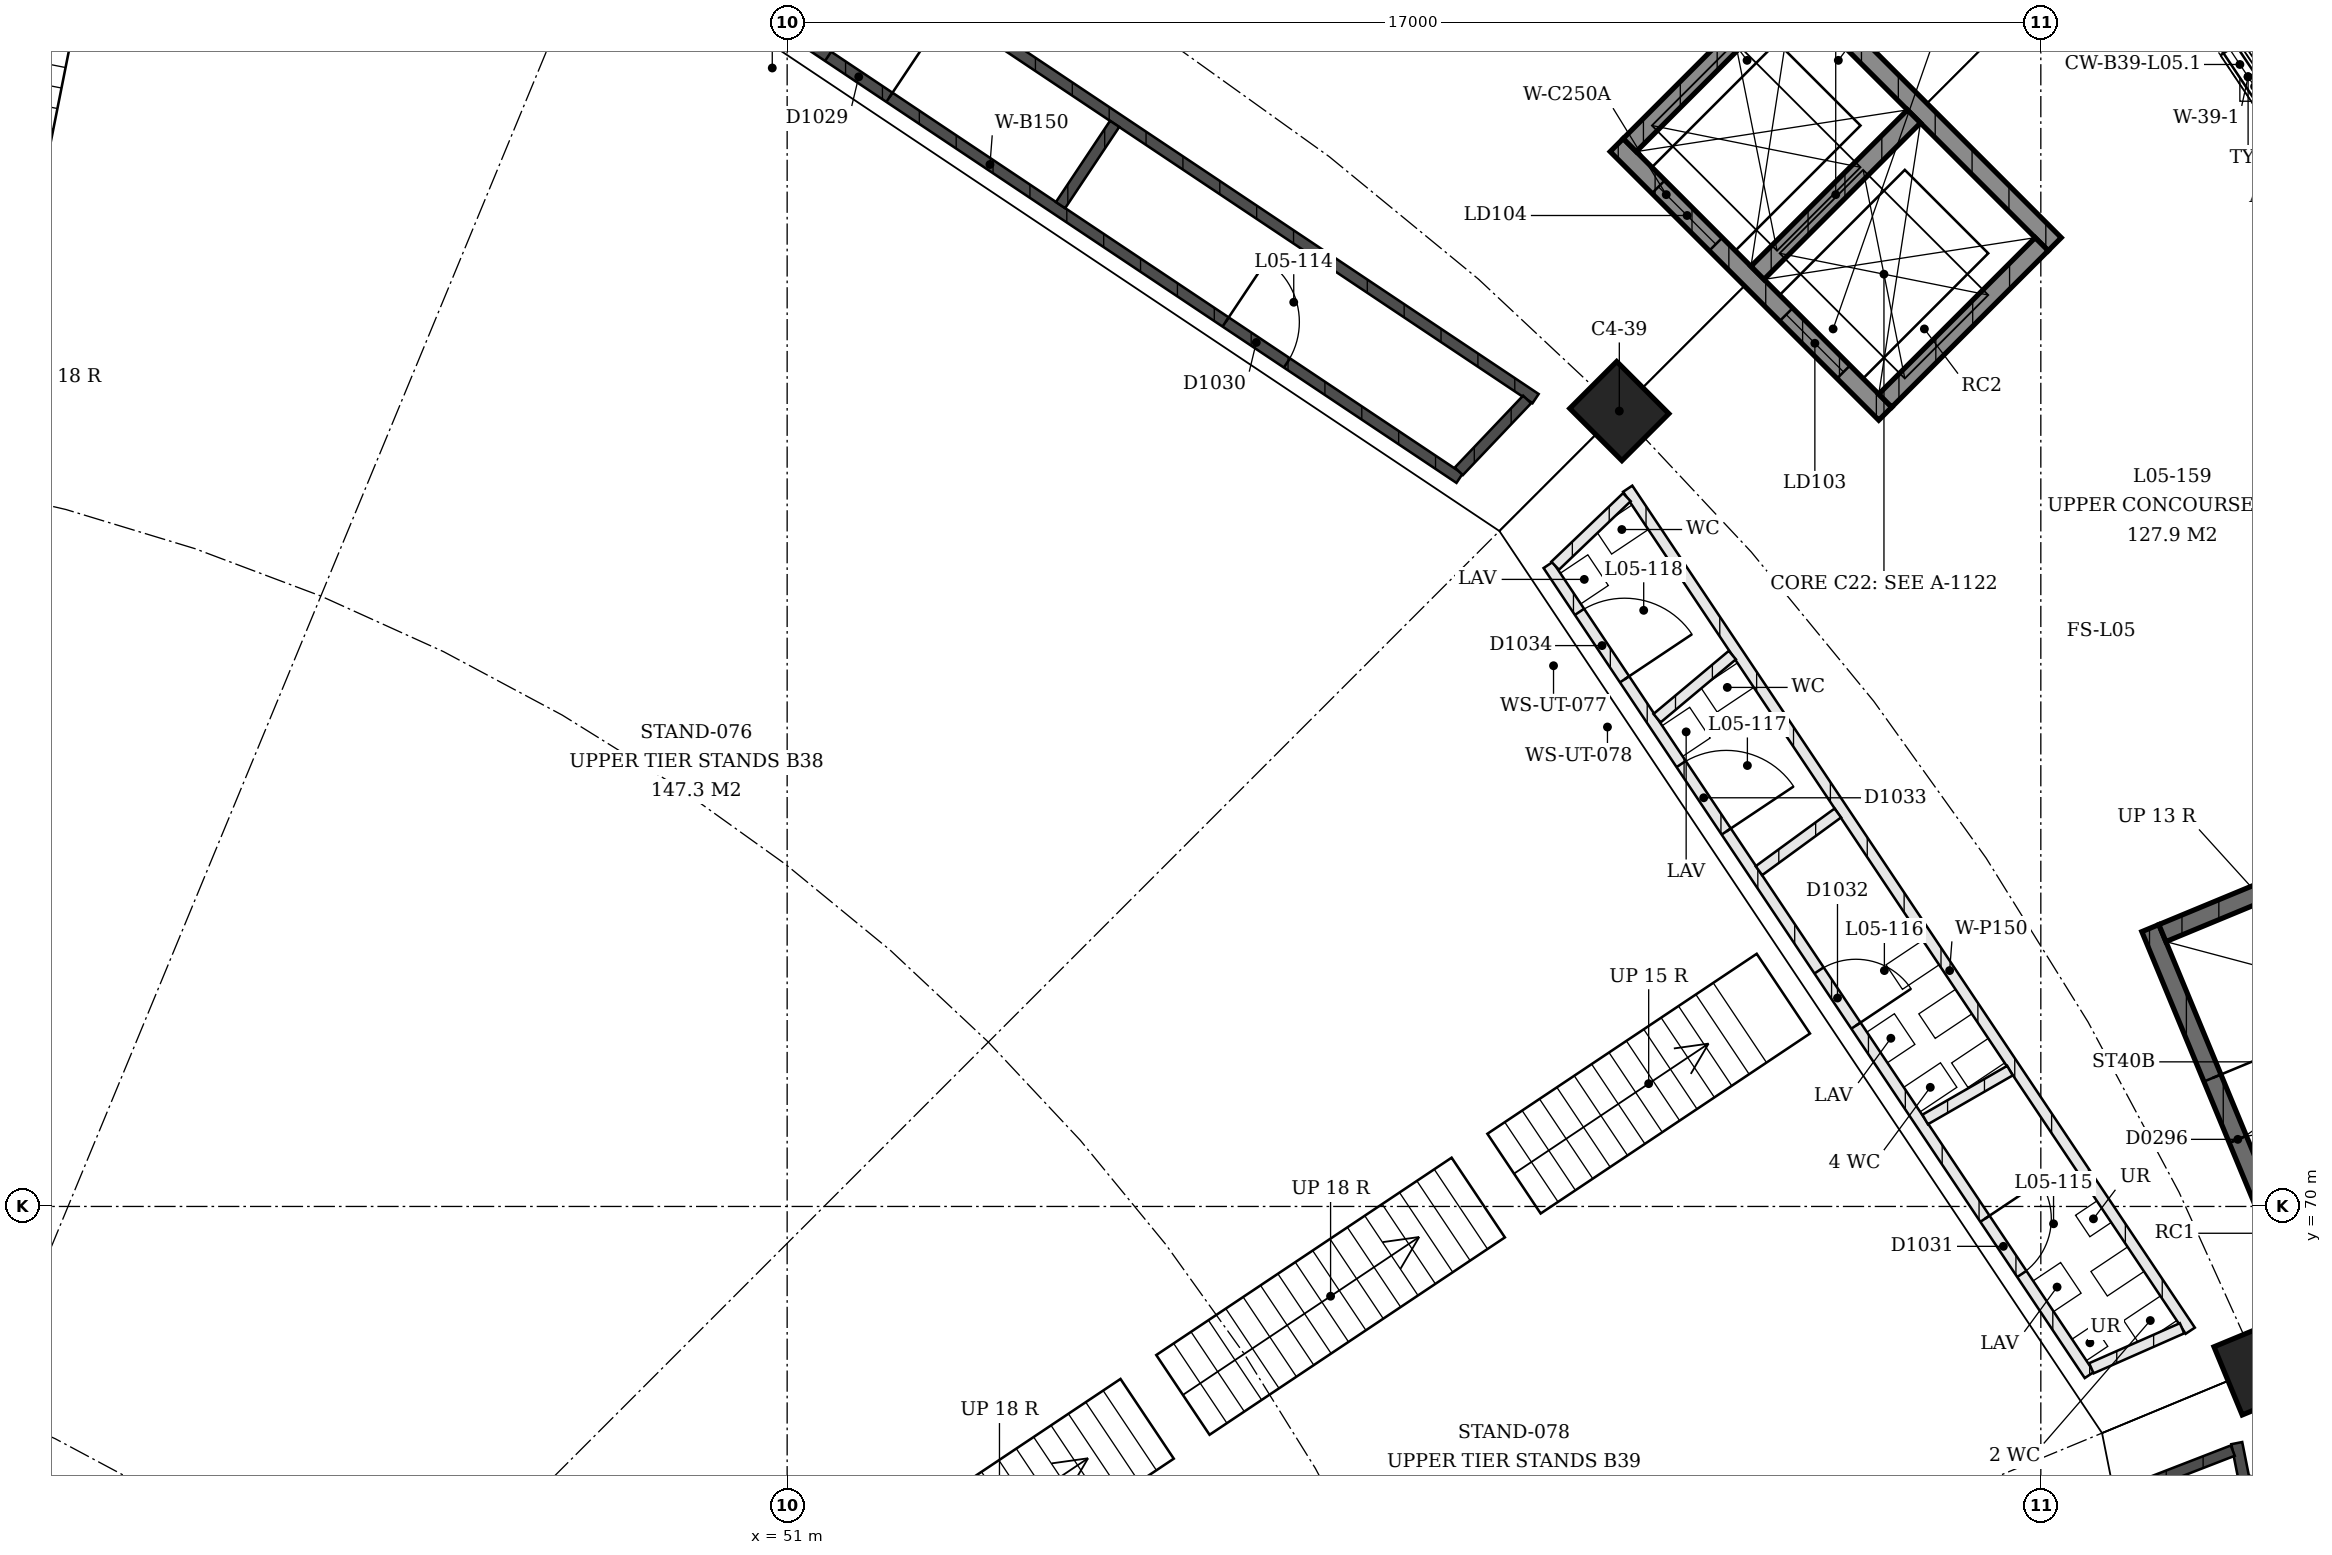
"""IFC4 building model, lengths in metres.
Left out: names, types, materials, properties, quantities, classifications, styles, units other than length and angle.
Written with IfcOpenShell. Run it as: python <this file> out.ifc"""

import sys

from ifc_helpers import new_model, si_unit, direction, frame, frame_2d, origin, origin_2d, place, context, subcontext, project, spatial, polyline, rectangle, outline, extrude, element, fill, save


model = new_model("IFC4")
c1 = context("Model", 3, precision=1e-05, world=origin(), true_north=direction((0.0, 1.0)))
c2 = subcontext(c1, "Body", "Model", "MODEL_VIEW")
j1 = project(units=[si_unit("LENGTHUNIT", "METRE"), si_unit("PLANEANGLEUNIT", "RADIAN")], contexts=[c1])
p1 = place(None, origin())
s1 = spatial("IfcSite", under=j1, at=p1, CompositionType="ELEMENT")
p2 = place(p1, origin())
s2 = spatial("IfcBuilding", under=s1, at=p2, CompositionType="ELEMENT")
p3 = place(p2, frame((0.0, 0.0, 22.5)))
s3 = spatial("IfcBuildingStorey", under=s2, at=p3, CompositionType="ELEMENT", Elevation=22.5)
for number, where, z_axis, x_axis in (
    (1, (62.284, 80.784, 0.0), (0.0, 0.0, 1.0), (-0.707, 0.707, 0.0)),
    (2, (70.955, 67.807, 0.0), (0.0, 0.0, 1.0), (-0.383, 0.924, 0.0)),
):
    element("IfcColumn", number, at=place(p3, frame(where, z_axis=z_axis, x_axis=x_axis)), inside=s3, PredefinedType="COLUMN", context=c2, shape_type="SweptSolid", body=[
        extrude(rectangle(XDim=1.0, YDim=0.9, at=origin_2d()), origin(), (0.0, 0.0, 1.0), 6.5),
    ])
p4 = place(p3, frame((69.767, 86.879, 4.1), z_axis=(0.0, 0.0, 1.0), x_axis=(0.555554703021, -0.831479988906, 0.0)))
e3 = element("IfcWall", 3, at=p4, inside=s3, PredefinedType="SOLIDWALL", context=c2, shape_type="SweptSolid", body=[
    extrude(outline(polyline([(0.0, 0.0), (3.757, 0.0), (3.757, 0.05), (3.635, 1.311), (3.271, 2.577), (2.678, 3.754), (1.879, 4.8), (1.079, 3.754), (0.486, 2.577), (0.123, 1.311), (0.0, 0.05), (0.0, 0.0)])), frame((0.0, 0.15, 0.0), z_axis=(0.0, -1.0, 0.0), x_axis=(1.0, 0.0, 0.0)), (0.0, 0.0, 1.0), 0.3),
])
p5 = place(p4, frame((1.428, 0.0, 0.4)))
e4 = element("IfcOpeningElement", 4, at=p5, cuts=e3, PredefinedType="OPENING", context=c2, shape_type="SweptSolid", body=[
    extrude(rectangle(XDim=0.9, YDim=3.6, at=frame_2d((0.45, 1.8))), frame((0.0, 0.16, 0.0), z_axis=(0.0, -1.0, 0.0), x_axis=(1.0, 0.0, 0.0)), (0.0, 0.0, 1.0), 0.32),
])
p6 = place(p3, frame((74.135, 62.549, 0.0), z_axis=(0.0, 0.0, 1.0), x_axis=(-0.382688386133, 0.923877480578, 0.0)))
e5 = element("IfcWall", 5, at=p6, inside=s3, PredefinedType="SHEAR", context=c2, shape_type="SweptSolid", body=[
    extrude(rectangle(XDim=12.15, YDim=0.25, at=frame_2d((6.075, 0.0))), origin(), (0.0, 0.0, 1.0), 2.1),
])
p7 = place(p6, frame((2.2, 0.0, 0.0)))
e6 = element("IfcOpeningElement", 6, at=p7, cuts=e5, PredefinedType="OPENING", context=c2, shape_type="SweptSolid", body=[
    extrude(rectangle(XDim=1.8, YDim=2.1, at=frame_2d((0.9, 1.05))), frame((0.0, 0.125, 0.0), z_axis=(0.0, -1.0, 0.0), x_axis=(1.0, 0.0, 0.0)), (0.0, 0.0, 1.0), 0.25),
])
p8 = place(p6, frame((8.15, 0.0, 0.0)))
e7 = element("IfcOpeningElement", 7, at=p8, cuts=e5, PredefinedType="OPENING", context=c2, shape_type="SweptSolid", body=[
    extrude(rectangle(XDim=1.8, YDim=2.1, at=frame_2d((0.9, 1.05))), frame((0.0, 0.125, 0.0), z_axis=(0.0, -1.0, 0.0), x_axis=(1.0, 0.0, 0.0)), (0.0, 0.0, 1.0), 0.25),
])
p9 = place(p3, frame((69.648, 73.706, 0.0), z_axis=(0.0, 0.0, 1.0), x_axis=(0.923887204407, 0.382664910245, 0.0)))
e8 = element("IfcWall", 8, at=p9, inside=s3, PredefinedType="SHEAR", context=c2, shape_type="SweptSolid", body=[
    extrude(rectangle(XDim=7.46, YDim=0.25, at=frame_2d((3.73, 0.0))), origin(), (0.0, 0.0, 1.0), 2.1),
])
p10 = place(p3, frame((65.891, 80.749, 0.0), z_axis=(0.0, 0.0, 1.0), x_axis=(-0.707106781187, 0.707106781187, 0.0)))
e9 = element("IfcWall", 9, at=p10, inside=s3, PredefinedType="SHEAR", context=c2, shape_type="SweptSolid", body=[
    extrude(rectangle(XDim=5.15, YDim=0.25, at=frame_2d((2.575, 0.0))), origin(), (0.0, 0.0, 1.0), 3.4),
])
p11 = place(p10, frame((0.8, 0.0, 0.0)))
e10 = element("IfcOpeningElement", 10, at=p11, cuts=e9, PredefinedType="OPENING", context=c2, shape_type="SweptSolid", body=[
    extrude(rectangle(XDim=1.1, YDim=2.1, at=frame_2d((0.55, 1.05))), frame((0.0, 0.125, 0.0), z_axis=(0.0, -1.0, 0.0), x_axis=(1.0, 0.0, 0.0)), (0.0, 0.0, 1.0), 0.25),
])
p12 = place(p10, frame((3.25, 0.0, 0.0)))
e11 = element("IfcOpeningElement", 11, at=p12, cuts=e9, PredefinedType="OPENING", context=c2, shape_type="SweptSolid", body=[
    extrude(rectangle(XDim=1.1, YDim=2.1, at=frame_2d((0.55, 1.05))), frame((0.0, 0.125, 0.0), z_axis=(0.0, -1.0, 0.0), x_axis=(1.0, 0.0, 0.0)), (0.0, 0.0, 1.0), 0.25),
])
p13 = place(p3, frame((68.189, 83.047, 0.0), z_axis=(0.0, 0.0, 1.0), x_axis=(-0.707106781187, 0.707106781187, 0.0)))
e12 = element("IfcWall", 12, at=p13, inside=s3, PredefinedType="SHEAR", context=c2, shape_type="SweptSolid", body=[
    extrude(rectangle(XDim=5.15, YDim=0.25, at=frame_2d((2.575, 0.0))), origin(), (0.0, 0.0, 1.0), 3.4),
])
for number, where, z_axis, x_axis in (
    (13, (65.891, 80.926, 0.0), (0.0, 0.0, 1.0), (0.707, 0.707, 0.0)),
    (14, (62.426, 84.391, 0.0), (0.0, 0.0, 1.0), (0.707, 0.707, 0.0)),
):
    element("IfcWall", number, at=place(p3, frame(where, z_axis=z_axis, x_axis=x_axis)), inside=s3, PredefinedType="SHEAR", context=c2, shape_type="SweptSolid", body=[
        extrude(rectangle(XDim=3.0, YDim=0.25, at=frame_2d((1.5, 0.0))), origin(), (0.0, 0.0, 1.0), 3.4),
    ])
p14 = place(p3, frame((64.158, 82.658, 0.0), z_axis=(0.0, 0.0, 1.0), x_axis=(0.707106781187, 0.707106781187, 0.0)))
e15 = element("IfcWall", 15, at=p14, inside=s3, PredefinedType="SHEAR", context=c2, shape_type="SweptSolid", body=[
    extrude(rectangle(XDim=3.0, YDim=0.25, at=frame_2d((1.5, 0.0))), origin(), (0.0, 0.0, 1.0), 3.4),
])
p15 = place(p3, frame((49.215, 87.158, 0.0), z_axis=(0.0, 0.0, 1.0), x_axis=(0.831468390799, -0.555572061125, 0.0)))
e16 = element("IfcWall", 16, at=p15, inside=s3, PredefinedType="SOLIDWALL", context=c2, shape_type="SweptSolid", body=[
    extrude(rectangle(XDim=13.113, YDim=0.15, at=frame_2d((6.557, 0.0))), origin(), (0.0, 0.0, 1.0), 3.0),
])
p16 = place(p15, frame((2.815, 0.0, 0.0)))
e17 = element("IfcOpeningElement", 17, at=p16, cuts=e16, PredefinedType="OPENING", context=c2, shape_type="SweptSolid", body=[
    extrude(rectangle(XDim=1.0, YDim=2.1, at=frame_2d((0.5, 1.05))), frame((0.0, 0.075, 0.0), z_axis=(0.0, -1.0, 0.0), x_axis=(1.0, 0.0, 0.0)), (0.0, 0.0, 1.0), 0.15),
])
p17 = place(p15, frame((9.298, 0.0, 0.0)))
e18 = element("IfcOpeningElement", 18, at=p17, cuts=e16, PredefinedType="OPENING", context=c2, shape_type="SweptSolid", body=[
    extrude(rectangle(XDim=1.0, YDim=2.1, at=frame_2d((0.5, 1.05))), frame((0.0, 0.075, 0.0), z_axis=(0.0, -1.0, 0.0), x_axis=(1.0, 0.0, 0.0)), (0.0, 0.0, 1.0), 0.15),
])
p18 = place(p3, frame((49.815, 88.526, 0.0), z_axis=(0.0, 0.0, 1.0), x_axis=(0.831462899962, -0.555580278616, 0.0)))
e19 = element("IfcWall", 19, at=p18, inside=s3, PredefinedType="SOLIDWALL", context=c2, shape_type="SweptSolid", body=[
    extrude(rectangle(XDim=13.631, YDim=0.15, at=frame_2d((6.815, 0.0))), origin(), (0.0, 0.0, 1.0), 3.0),
])
p19 = place(p3, frame((54.707, 83.576, 0.0), z_axis=(0.0, 0.0, 1.0), x_axis=(0.554402331293, 0.832248793966, 0.0)))
e20 = element("IfcWall", 20, at=p19, inside=s3, PredefinedType="SOLIDWALL", context=c2, shape_type="SweptSolid", body=[
    extrude(rectangle(XDim=1.324, YDim=0.15, at=frame_2d((0.662, 0.0))), origin(), (0.0, 0.0, 1.0), 3.0),
])
p20 = place(p3, frame((60.108, 79.968, 0.0), z_axis=(0.0, 0.0, 1.0), x_axis=(0.688797211472, 0.724954068523, 0.0)))
e21 = element("IfcWall", 21, at=p20, inside=s3, PredefinedType="SOLIDWALL", context=c2, shape_type="SweptSolid", body=[
    extrude(rectangle(XDim=1.344, YDim=0.15, at=frame_2d((0.672, 0.0))), origin(), (0.0, 0.0, 1.0), 3.0),
])
p21 = place(p3, frame((68.658, 67.715, 0.0), z_axis=(0.0, 0.0, 1.0), x_axis=(-0.555570028225, 0.831469749142, 0.0)))
e22 = element("IfcWall", 22, at=p21, inside=s3, PredefinedType="PARTITIONING", context=c2, shape_type="SweptSolid", body=[
    extrude(rectangle(XDim=13.209, YDim=0.15, at=frame_2d((6.604, 0.0))), origin(), (0.0, 0.0, 1.0), 3.0),
])
p22 = place(p21, frame((1.648, 0.0, 0.0)))
e23 = element("IfcOpeningElement", 23, at=p22, cuts=e22, PredefinedType="OPENING", context=c2, shape_type="SweptSolid", body=[
    extrude(rectangle(XDim=0.9, YDim=2.1, at=frame_2d((0.45, 1.05))), frame((0.0, 0.075, 0.0), z_axis=(0.0, -1.0, 0.0), x_axis=(1.0, 0.0, 0.0)), (0.0, 0.0, 1.0), 0.15),
])
p23 = place(p21, frame((5.697, 0.0, 0.0)))
e24 = element("IfcOpeningElement", 24, at=p23, cuts=e22, PredefinedType="OPENING", context=c2, shape_type="SweptSolid", body=[
    extrude(rectangle(XDim=0.9, YDim=2.1, at=frame_2d((0.45, 1.05))), frame((0.0, 0.075, 0.0), z_axis=(0.0, -1.0, 0.0), x_axis=(1.0, 0.0, 0.0)), (0.0, 0.0, 1.0), 0.15),
])
p24 = place(p21, frame((8.863, 0.0, 0.0)))
e25 = element("IfcOpeningElement", 25, at=p24, cuts=e22, PredefinedType="OPENING", context=c2, shape_type="SweptSolid", body=[
    extrude(rectangle(XDim=1.1, YDim=2.1, at=frame_2d((0.55, 1.05))), frame((0.0, 0.075, 0.0), z_axis=(0.0, -1.0, 0.0), x_axis=(1.0, 0.0, 0.0)), (0.0, 0.0, 1.0), 0.15),
])
p25 = place(p21, frame((11.344, 0.0, 0.0)))
e26 = element("IfcOpeningElement", 26, at=p25, cuts=e22, PredefinedType="OPENING", context=c2, shape_type="SweptSolid", body=[
    extrude(rectangle(XDim=1.1, YDim=2.1, at=frame_2d((0.55, 1.05))), frame((0.0, 0.075, 0.0), z_axis=(0.0, -1.0, 0.0), x_axis=(1.0, 0.0, 0.0)), (0.0, 0.0, 1.0), 0.15),
])
p26 = place(p3, frame((70.026, 68.315, 0.0), z_axis=(0.0, 0.0, 1.0), x_axis=(-0.555573905052, 0.831467158717, 0.0)))
e27 = element("IfcWall", 27, at=p26, inside=s3, PredefinedType="PARTITIONING", context=c2, shape_type="SweptSolid", body=[
    extrude(rectangle(XDim=13.73, YDim=0.15, at=frame_2d((6.865, 0.0))), origin(), (0.0, 0.0, 1.0), 3.0),
])
p27 = place(p3, frame((68.685, 67.806, 0.0), z_axis=(0.0, 0.0, 1.0), x_axis=(0.914894130368, 0.403693857048, 0.0)))
e28 = element("IfcWall", 28, at=p27, inside=s3, PredefinedType="PARTITIONING", context=c2, shape_type="SweptSolid", body=[
    extrude(rectangle(XDim=1.344, YDim=0.15, at=frame_2d((0.672, 0.0))), origin(), (0.0, 0.0, 1.0), 3.0),
])
p28 = place(p3, frame((66.431, 71.179, 0.0), z_axis=(0.0, 0.0, 1.0), x_axis=(0.866607990837, 0.498989569246, 0.0)))
e29 = element("IfcWall", 29, at=p28, inside=s3, PredefinedType="PARTITIONING", context=c2, shape_type="SweptSolid", body=[
    extrude(rectangle(XDim=1.327, YDim=0.15, at=frame_2d((0.664, 0.0))), origin(), (0.0, 0.0, 1.0), 3.0),
])
p29 = place(p3, frame((64.177, 74.553, 0.0), z_axis=(0.0, 0.0, 1.0), x_axis=(0.807323605105, 0.59010897014, 0.0)))
e30 = element("IfcWall", 30, at=p29, inside=s3, PredefinedType="PARTITIONING", context=c2, shape_type="SweptSolid", body=[
    extrude(rectangle(XDim=1.325, YDim=0.15, at=frame_2d((0.663, 0.0))), origin(), (0.0, 0.0, 1.0), 3.0),
])
p30 = place(p3, frame((62.796, 76.62, 0.0), z_axis=(0.0, 0.0, 1.0), x_axis=(0.766596080784, 0.642129620035, 0.0)))
e31 = element("IfcWall", 31, at=p30, inside=s3, PredefinedType="PARTITIONING", context=c2, shape_type="SweptSolid", body=[
    extrude(rectangle(XDim=1.332, YDim=0.15, at=frame_2d((0.666, 0.0))), origin(), (0.0, 0.0, 1.0), 3.0),
])
p31 = place(p3, frame((61.414, 78.688, 0.0), z_axis=(0.0, 0.0, 1.0), x_axis=(0.723174104738, 0.690665776072, 0.0)))
e32 = element("IfcWall", 32, at=p31, inside=s3, PredefinedType="PARTITIONING", context=c2, shape_type="SweptSolid", body=[
    extrude(rectangle(XDim=1.344, YDim=0.15, at=frame_2d((0.672, 0.0))), origin(), (0.0, 0.0, 1.0), 3.0),
])
p32 = place(p3, frame((70.657, 66.791, 0.0), z_axis=(0.0, 0.0, 1.0), x_axis=(0.195103376128, -0.980782683689, 0.0)))
e33 = element("IfcWall", 33, at=p32, inside=s3, PredefinedType="SOLIDWALL", context=c2, shape_type="SweptSolid", body=[
    extrude(rectangle(XDim=13.631, YDim=0.15, at=frame_2d((6.815, 0.0))), origin(), (0.0, 0.0, 1.0), 3.0),
])
p33 = place(p3, frame((69.349, 66.203, 0.0), z_axis=(0.0, 0.0, 1.0), x_axis=(0.932406277831, 0.36141186071, 0.0)))
e34 = element("IfcWall", 34, at=p33, inside=s3, PredefinedType="SOLIDWALL", context=c2, shape_type="SweptSolid", body=[
    extrude(rectangle(XDim=1.344, YDim=0.15, at=frame_2d((0.672, 0.0))), origin(), (0.0, 0.0, 1.0), 3.0),
])
p34 = place(p5, origin())
e35 = element("IfcWindow", 35, at=p34, inside=s3, PartitioningType="SINGLE_PANEL", PredefinedType="WINDOW", context=c2, shape_type="SweptSolid", body=[
    extrude(rectangle(XDim=0.9, YDim=3.6, at=frame_2d((0.45, 1.8))), frame((0.0, 0.03, 0.0), z_axis=(0.0, -1.0, 0.0), x_axis=(1.0, 0.0, 0.0)), (0.0, 0.0, 1.0), 0.06),
])
fill(e4, e35)
p35 = place(p8, origin())
e36 = element("IfcDoor", 36, at=p35, inside=s3, OperationType="DOUBLE_DOOR_SINGLE_SWING", PredefinedType="DOOR", context=c2, shape_type="SweptSolid", body=[
    extrude(rectangle(XDim=1.8, YDim=2.1, at=frame_2d((0.9, 1.05))), frame((0.0, 0.025, 0.0), z_axis=(0.0, -1.0, 0.0), x_axis=(1.0, 0.0, 0.0)), (0.0, 0.0, 1.0), 0.05),
])
fill(e7, e36)
p36 = place(p11, origin())
e37 = element("IfcDoor", 37, at=p36, inside=s3, OperationType="SLIDING_TO_LEFT", PredefinedType="DOOR", context=c2, shape_type="SweptSolid", body=[
    extrude(rectangle(XDim=1.1, YDim=2.1, at=frame_2d((0.55, 1.05))), frame((0.0, 0.025, 0.0), z_axis=(0.0, -1.0, 0.0), x_axis=(1.0, 0.0, 0.0)), (0.0, 0.0, 1.0), 0.05),
])
fill(e10, e37)
p37 = place(p12, origin())
e38 = element("IfcDoor", 38, at=p37, inside=s3, OperationType="SLIDING_TO_LEFT", PredefinedType="DOOR", context=c2, shape_type="SweptSolid", body=[
    extrude(rectangle(XDim=1.1, YDim=2.1, at=frame_2d((0.55, 1.05))), frame((0.0, 0.025, 0.0), z_axis=(0.0, -1.0, 0.0), x_axis=(1.0, 0.0, 0.0)), (0.0, 0.0, 1.0), 0.05),
])
fill(e11, e38)
p38 = place(p16, origin())
e39 = element("IfcDoor", 39, at=p38, inside=s3, OperationType="SINGLE_SWING_LEFT", PredefinedType="DOOR", context=c2, shape_type="SweptSolid", body=[
    extrude(rectangle(XDim=1.0, YDim=2.1, at=frame_2d((0.5, 1.05))), frame((0.0, 0.025, 0.0), z_axis=(0.0, -1.0, 0.0), x_axis=(1.0, 0.0, 0.0)), (0.0, 0.0, 1.0), 0.05),
])
fill(e17, e39)
p39 = place(p17, origin())
e40 = element("IfcDoor", 40, at=p39, inside=s3, OperationType="SINGLE_SWING_RIGHT", PredefinedType="DOOR", context=c2, shape_type="SweptSolid", body=[
    extrude(rectangle(XDim=1.0, YDim=2.1, at=frame_2d((0.5, 1.05))), frame((0.0, 0.025, 0.0), z_axis=(0.0, -1.0, 0.0), x_axis=(1.0, 0.0, 0.0)), (0.0, 0.0, 1.0), 0.05),
])
fill(e18, e40)
p40 = place(p22, origin())
e41 = element("IfcDoor", 41, at=p40, inside=s3, OperationType="SINGLE_SWING_RIGHT", PredefinedType="DOOR", context=c2, shape_type="SweptSolid", body=[
    extrude(rectangle(XDim=0.9, YDim=2.1, at=frame_2d((0.45, 1.05))), frame((0.0, 0.025, 0.0), z_axis=(0.0, -1.0, 0.0), x_axis=(1.0, 0.0, 0.0)), (0.0, 0.0, 1.0), 0.05),
])
fill(e23, e41)
p41 = place(p23, origin())
e42 = element("IfcDoor", 42, at=p41, inside=s3, OperationType="SINGLE_SWING_LEFT", PredefinedType="DOOR", context=c2, shape_type="SweptSolid", body=[
    extrude(rectangle(XDim=0.9, YDim=2.1, at=frame_2d((0.45, 1.05))), frame((0.0, 0.025, 0.0), z_axis=(0.0, -1.0, 0.0), x_axis=(1.0, 0.0, 0.0)), (0.0, 0.0, 1.0), 0.05),
])
fill(e24, e42)
p42 = place(p24, origin())
e43 = element("IfcDoor", 43, at=p42, inside=s3, OperationType="SINGLE_SWING_LEFT", PredefinedType="DOOR", context=c2, shape_type="SweptSolid", body=[
    extrude(rectangle(XDim=1.1, YDim=2.1, at=frame_2d((0.55, 1.05))), frame((0.0, 0.025, 0.0), z_axis=(0.0, -1.0, 0.0), x_axis=(1.0, 0.0, 0.0)), (0.0, 0.0, 1.0), 0.05),
])
fill(e25, e43)
p43 = place(p25, origin())
e44 = element("IfcDoor", 44, at=p43, inside=s3, OperationType="SINGLE_SWING_LEFT", PredefinedType="DOOR", context=c2, shape_type="SweptSolid", body=[
    extrude(rectangle(XDim=1.1, YDim=2.1, at=frame_2d((0.55, 1.05))), frame((0.0, 0.025, 0.0), z_axis=(0.0, -1.0, 0.0), x_axis=(1.0, 0.0, 0.0)), (0.0, 0.0, 1.0), 0.05),
])
fill(e26, e44)
save(model, sys.argv[1])
